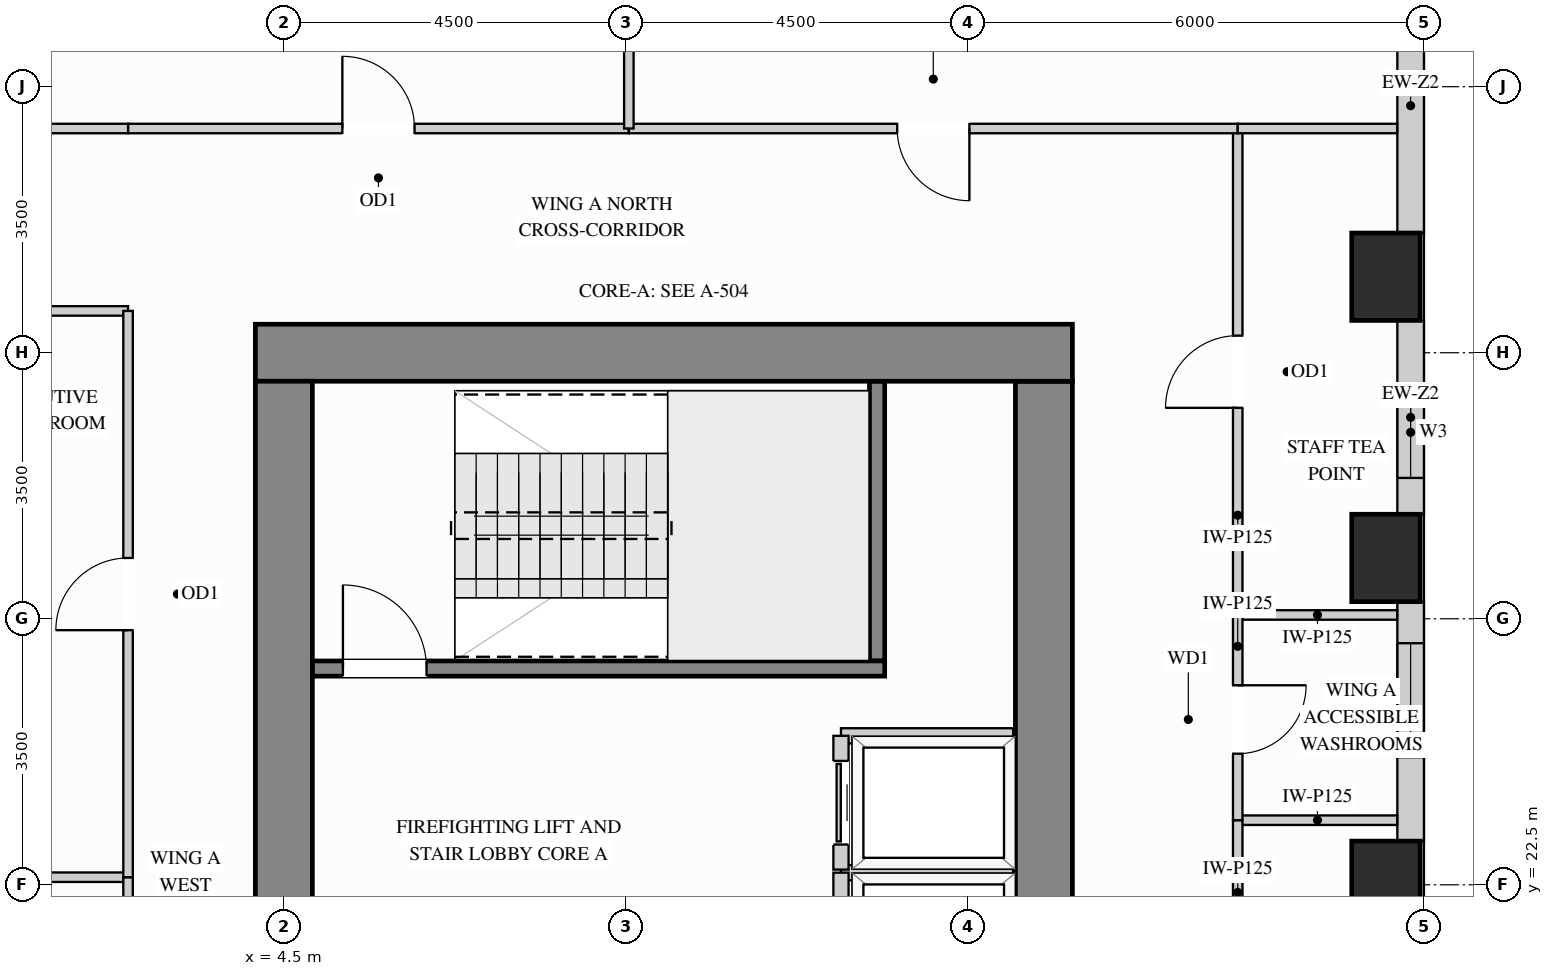
"""IFC4 building model, lengths in metres.
Left out: names, types, materials, properties, quantities, classifications, styles, units other than length and angle.
Written with IfcOpenShell. Run it as: python <this file> out.ifc"""

import sys

from ifc_helpers import new_model, si_unit, direction, frame, frame_2d, origin, origin_2d, place, context, subcontext, project, spatial, rectangle, extrude, source, transform, mapped, element, fill, save


model = new_model("IFC4")
c1 = context("Model", 3, precision=1e-05, world=origin(), true_north=direction((0.0, 1.0)))
c2 = subcontext(c1, "Body", "Model", "MODEL_VIEW")
j1 = project(units=[si_unit("LENGTHUNIT", "METRE"), si_unit("PLANEANGLEUNIT", "RADIAN")], contexts=[c1])
p1 = place(None, origin())
s1 = spatial("IfcSite", under=j1, at=p1, CompositionType="ELEMENT")
p2 = place(p1, origin())
s2 = spatial("IfcBuilding", under=s1, at=p2, CompositionType="ELEMENT")
p3 = place(p2, frame((0.0, 0.0, 131.4)))
s3 = spatial("IfcBuildingStorey", under=s2, at=p3, CompositionType="ELEMENT", Elevation=131.4)
m1 = source(origin(), c2, "Body", "SweptSolid", [
    extrude(rectangle(XDim=0.9, YDim=1.15, at=origin_2d()), origin(), (0.0, 0.0, 1.0), 3.38),
])
for number, where, z_axis, x_axis in (
    (1, (19.0, 22.5, 0.0), (0.0, 0.0, 1.0), (1.0, 0.0, 0.0)),
    (2, (19.0, 26.8, 0.0), (0.0, 0.0, 1.0), (1.0, 0.0, 0.0)),
    (3, (19.0, 30.5, 0.0), (0.0, 0.0, 1.0), (1.0, 0.0, 0.0)),
):
    element("IfcColumn", number, at=place(p3, frame(where, z_axis=z_axis, x_axis=x_axis)), inside=s3, PredefinedType="COLUMN", context=c2, shape_type="MappedRepresentation", body=[
        mapped(m1, transform((0.0, 0.0, 0.0), x_axis=(1.0, 0.0, 0.0), y_axis=(0.0, 1.0, 0.0), z_axis=(0.0, 0.0, 1.0))),
    ])
m2 = source(origin(), c2, "Body", "SweptSolid", [
    extrude(rectangle(XDim=8.245, YDim=0.75, at=frame_2d((4.123, 0.0))), origin(), (0.0, 0.0, 1.0), 3.38),
])
p4 = place(p3, frame((14.5, 20.88, 0.0), z_axis=(0.0, 0.0, 1.0), x_axis=(0.0, 1.0, 0.0)))
e4 = element("IfcWall", 4, at=p4, inside=s3, PredefinedType="SHEAR", context=c2, shape_type="MappedRepresentation", body=[
    mapped(m2, transform((0.0, 0.0, 0.0), x_axis=(1.0, 0.0, 0.0), y_axis=(0.0, 1.0, 0.0), z_axis=(0.0, 0.0, 1.0))),
])
m3 = source(origin(), c2, "Body", "SweptSolid", [
    extrude(rectangle(XDim=10.75, YDim=0.75, at=frame_2d((5.375, 0.0))), origin(), (0.0, 0.0, 1.0), 3.38),
])
p5 = place(p3, frame((4.125, 29.5, 0.0), z_axis=(0.0, 0.0, 1.0), x_axis=(1.0, 0.0, 0.0)))
e5 = element("IfcWall", 5, at=p5, inside=s3, PredefinedType="SHEAR", context=c2, shape_type="MappedRepresentation", body=[
    mapped(m3, transform((0.0, 0.0, 0.0), x_axis=(1.0, 0.0, 0.0), y_axis=(0.0, 1.0, 0.0), z_axis=(0.0, 0.0, 1.0))),
])
m4 = source(origin(), c2, "Body", "SweptSolid", [
    extrude(rectangle(XDim=20.25, YDim=0.75, at=frame_2d((10.125, 0.0))), origin(), (0.0, 0.0, 1.0), 3.38),
])
p6 = place(p3, frame((4.5, 8.875, 0.0), z_axis=(0.0, 0.0, 1.0), x_axis=(0.0, 1.0, 0.0)))
e6 = element("IfcWall", 6, at=p6, inside=s3, PredefinedType="SHEAR", context=c2, shape_type="MappedRepresentation", body=[
    mapped(m4, transform((0.0, 0.0, 0.0), x_axis=(1.0, 0.0, 0.0), y_axis=(0.0, 1.0, 0.0), z_axis=(0.0, 0.0, 1.0))),
])
p7 = place(p3, frame((19.325, 23.073, 0.0), z_axis=(0.0, 0.0, 1.0), x_axis=(0.0, 1.0, 0.0)))
e7 = element("IfcWall", 7, at=p7, inside=s3, PredefinedType="SOLIDWALL", context=c2, shape_type="SweptSolid", body=[
    extrude(rectangle(XDim=3.154, YDim=0.35, at=frame_2d((1.577, 0.0))), origin(), (0.0, 0.0, 1.0), 2.519),
])
p8 = place(p7, frame((1.105, 0.0, 0.78)))
e8 = element("IfcOpeningElement", 8, at=p8, cuts=e7, PredefinedType="OPENING", context=c2, shape_type="SweptSolid", body=[
    extrude(rectangle(XDim=1.5, YDim=1.559, at=frame_2d((0.75, 0.78))), frame((0.0, 0.185, 0.0), z_axis=(0.0, -1.0, 0.0), x_axis=(1.0, 0.0, 0.0)), (0.0, 0.0, 1.0), 0.37),
])
p9 = place(p3, frame((19.325, 27.373, 0.0), z_axis=(0.0, 0.0, 1.0), x_axis=(0.0, 1.0, 0.0)))
e9 = element("IfcWall", 9, at=p9, inside=s3, PredefinedType="SOLIDWALL", context=c2, shape_type="SweptSolid", body=[
    extrude(rectangle(XDim=2.554, YDim=0.35, at=frame_2d((1.277, 0.0))), origin(), (0.0, 0.0, 1.0), 2.519),
])
p10 = place(p9, frame((0.48, 0.0, 0.78)))
e10 = element("IfcOpeningElement", 10, at=p10, cuts=e9, PredefinedType="OPENING", context=c2, shape_type="SweptSolid", body=[
    extrude(rectangle(XDim=1.2, YDim=1.559, at=frame_2d((0.6, 0.78))), frame((0.0, 0.185, 0.0), z_axis=(0.0, -1.0, 0.0), x_axis=(1.0, 0.0, 0.0)), (0.0, 0.0, 1.0), 0.37),
])
m5 = source(origin(), c2, "Body", "SweptSolid", [
    extrude(rectangle(XDim=3.354, YDim=0.35, at=frame_2d((1.677, 0.0))), origin(), (0.0, 0.0, 1.0), 2.519),
])
p11 = place(p3, frame((19.325, 31.073, 0.0), z_axis=(0.0, 0.0, 1.0), x_axis=(0.0, 1.0, 0.0)))
e11 = element("IfcWall", 11, at=p11, inside=s3, PredefinedType="SOLIDWALL", context=c2, shape_type="MappedRepresentation", body=[
    mapped(m5, transform((0.0, 0.0, 0.0), x_axis=(1.0, 0.0, 0.0), y_axis=(0.0, 1.0, 0.0), z_axis=(0.0, 0.0, 1.0))),
])
m6 = source(origin(), c2, "Body", "SweptSolid", [
    extrude(rectangle(XDim=2.098, YDim=0.125, at=frame_2d((1.049, 0.0))), origin(), (0.0, 0.0, 1.0), 3.365),
])
for number, where, z_axis, x_axis in (
    (12, (17.05, 23.35, 0.0), (0.0, 0.0, 1.0), (1.0, 0.0, 0.0)),
    (13, (17.05, 26.05, 0.0), (0.0, 0.0, 1.0), (1.0, 0.0, 0.0)),
):
    element("IfcWall", number, at=place(p3, frame(where, z_axis=z_axis, x_axis=x_axis)), inside=s3, PredefinedType="PARTITIONING", context=c2, shape_type="MappedRepresentation", body=[
        mapped(m6, transform((0.0, 0.0, 0.0), x_axis=(1.0, 0.0, 0.0), y_axis=(0.0, 1.0, 0.0), z_axis=(0.0, 0.0, 1.0))),
    ])
p12 = place(p3, frame((17.05, 18.4, 0.0), z_axis=(0.0, 0.0, 1.0), x_axis=(0.0, 1.0, 0.0)))
e14 = element("IfcWall", 14, at=p12, inside=s3, PredefinedType="PARTITIONING", context=c2, shape_type="SweptSolid", body=[
    extrude(rectangle(XDim=4.95, YDim=0.125, at=frame_2d((2.475, 0.0))), origin(), (0.0, 0.0, 1.0), 3.365),
])
p13 = place(p12, frame((2.0, 0.0, 0.0)))
e15 = element("IfcOpeningElement", 15, at=p13, cuts=e14, PredefinedType="OPENING", context=c2, shape_type="SweptSolid", body=[
    extrude(rectangle(XDim=0.95, YDim=2.15, at=frame_2d((0.475, 1.075))), frame((0.0, 0.073, 0.0), z_axis=(0.0, -1.0, 0.0), x_axis=(1.0, 0.0, 0.0)), (0.0, 0.0, 1.0), 0.145),
])
p14 = place(p3, frame((17.05, 26.05, 0.0), z_axis=(0.0, 0.0, 1.0), x_axis=(0.0, 1.0, 0.0)))
e16 = element("IfcWall", 16, at=p14, inside=s3, PredefinedType="PARTITIONING", context=c2, shape_type="SweptSolid", body=[
    extrude(rectangle(XDim=6.4, YDim=0.125, at=frame_2d((3.2, 0.0))), origin(), (0.0, 0.0, 1.0), 3.365),
])
p15 = place(p14, frame((2.725, 0.0, 0.0)))
e17 = element("IfcOpeningElement", 17, at=p15, cuts=e16, PredefinedType="OPENING", context=c2, shape_type="SweptSolid", body=[
    extrude(rectangle(XDim=0.95, YDim=2.15, at=frame_2d((0.475, 1.075))), frame((0.0, 0.073, 0.0), z_axis=(0.0, -1.0, 0.0), x_axis=(1.0, 0.0, 0.0)), (0.0, 0.0, 1.0), 0.145),
])
p16 = place(p3, frame((17.05, 23.35, 0.0), z_axis=(0.0, 0.0, 1.0), x_axis=(0.0, 1.0, 0.0)))
e18 = element("IfcWall", 18, at=p16, inside=s3, PredefinedType="PARTITIONING", context=c2, shape_type="SweptSolid", body=[
    extrude(rectangle(XDim=2.7, YDim=0.125, at=frame_2d((1.35, 0.0))), origin(), (0.0, 0.0, 1.0), 3.365),
])
p17 = place(p16, frame((0.875, 0.0, 0.0)))
e19 = element("IfcOpeningElement", 19, at=p17, cuts=e18, PredefinedType="OPENING", context=c2, shape_type="SweptSolid", body=[
    extrude(rectangle(XDim=0.9, YDim=2.15, at=frame_2d((0.45, 1.075))), frame((0.0, 0.073, 0.0), z_axis=(0.0, -1.0, 0.0), x_axis=(1.0, 0.0, 0.0)), (0.0, 0.0, 1.0), 0.145),
])
p18 = place(p3, frame((2.45, 32.45, 0.0), z_axis=(0.0, 0.0, 1.0), x_axis=(1.0, 0.0, 0.0)))
e20 = element("IfcWall", 20, at=p18, inside=s3, PredefinedType="PARTITIONING", context=c2, shape_type="SweptSolid", body=[
    extrude(rectangle(XDim=6.589, YDim=0.125, at=frame_2d((3.294, 0.0))), origin(), (0.0, 0.0, 1.0), 3.365),
])
p19 = place(p18, frame((2.82, 0.0, 0.0)))
e21 = element("IfcOpeningElement", 21, at=p19, cuts=e20, PredefinedType="OPENING", context=c2, shape_type="SweptSolid", body=[
    extrude(rectangle(XDim=0.95, YDim=2.15, at=frame_2d((0.475, 1.075))), frame((0.0, 0.073, 0.0), z_axis=(0.0, -1.0, 0.0), x_axis=(1.0, 0.0, 0.0)), (0.0, 0.0, 1.0), 0.145),
])
p20 = place(p3, frame((9.039, 32.45, 0.0), z_axis=(0.0, 0.0, 1.0), x_axis=(1.0, 0.0, 0.0)))
e22 = element("IfcWall", 22, at=p20, inside=s3, PredefinedType="PARTITIONING", context=c2, shape_type="SweptSolid", body=[
    extrude(rectangle(XDim=8.011, YDim=0.125, at=frame_2d((4.005, 0.0))), origin(), (0.0, 0.0, 1.0), 3.365),
])
p21 = place(p20, frame((3.531, 0.0, 0.0)))
e23 = element("IfcOpeningElement", 23, at=p21, cuts=e22, PredefinedType="OPENING", context=c2, shape_type="SweptSolid", body=[
    extrude(rectangle(XDim=0.95, YDim=2.15, at=frame_2d((0.475, 1.075))), frame((0.0, 0.073, 0.0), z_axis=(0.0, -1.0, 0.0), x_axis=(1.0, 0.0, 0.0)), (0.0, 0.0, 1.0), 0.145),
])
for number, where, z_axis, x_axis in (
    (24, (17.05, 32.45, 0.0), (0.0, 0.0, 1.0), (1.0, 0.0, 0.0)),
    (25, (0.352, 32.45, 0.0), (0.0, 0.0, 1.0), (1.0, 0.0, 0.0)),
):
    element("IfcWall", number, at=place(p3, frame(where, z_axis=z_axis, x_axis=x_axis)), inside=s3, PredefinedType="PARTITIONING", context=c2, shape_type="MappedRepresentation", body=[
        mapped(m6, transform((0.0, 0.0, 0.0), x_axis=(1.0, 0.0, 0.0), y_axis=(0.0, 1.0, 0.0), z_axis=(0.0, 0.0, 1.0))),
    ])
m7 = source(origin(), c2, "Body", "SweptSolid", [
    extrude(rectangle(XDim=4.86, YDim=0.125, at=frame_2d((2.43, 0.0))), origin(), (0.0, 0.0, 1.0), 3.365),
])
p22 = place(p3, frame((9.039, 32.45, 0.0), z_axis=(0.0, 0.0, 1.0), x_axis=(0.0, 1.0, 0.0)))
e26 = element("IfcWall", 26, at=p22, inside=s3, PredefinedType="PARTITIONING", context=c2, shape_type="MappedRepresentation", body=[
    mapped(m7, transform((0.0, 0.0, 0.0), x_axis=(1.0, 0.0, 0.0), y_axis=(0.0, 1.0, 0.0), z_axis=(0.0, 0.0, 1.0))),
])
m8 = source(origin(), c2, "Body", "SweptSolid", [
    extrude(rectangle(XDim=1.26, YDim=0.125, at=frame_2d((0.63, 0.0))), origin(), (0.0, 0.0, 1.0), 3.365),
])
for number, where, z_axis, x_axis in (
    (27, (1.19, 30.05, 0.0), (0.0, 0.0, 1.0), (1.0, 0.0, 0.0)),
    (28, (1.19, 22.6, 0.0), (0.0, 0.0, 1.0), (1.0, 0.0, 0.0)),
):
    element("IfcWall", number, at=place(p3, frame(where, z_axis=z_axis, x_axis=x_axis)), inside=s3, PredefinedType="PARTITIONING", context=c2, shape_type="MappedRepresentation", body=[
        mapped(m8, transform((0.0, 0.0, 0.0), x_axis=(1.0, 0.0, 0.0), y_axis=(0.0, 1.0, 0.0), z_axis=(0.0, 0.0, 1.0))),
    ])
p23 = place(p3, frame((2.45, 15.1, 0.0), z_axis=(0.0, 0.0, 1.0), x_axis=(0.0, 1.0, 0.0)))
e29 = element("IfcWall", 29, at=p23, inside=s3, PredefinedType="PARTITIONING", context=c2, shape_type="SweptSolid", body=[
    extrude(rectangle(XDim=7.5, YDim=0.125, at=frame_2d((3.75, 0.0))), origin(), (0.0, 0.0, 1.0), 3.365),
])
p24 = place(p23, frame((3.275, 0.0, 0.0)))
e30 = element("IfcOpeningElement", 30, at=p24, cuts=e29, PredefinedType="OPENING", context=c2, shape_type="SweptSolid", body=[
    extrude(rectangle(XDim=0.95, YDim=2.15, at=frame_2d((0.475, 1.075))), frame((0.0, 0.073, 0.0), z_axis=(0.0, -1.0, 0.0), x_axis=(1.0, 0.0, 0.0)), (0.0, 0.0, 1.0), 0.145),
])
p25 = place(p3, frame((2.45, 22.6, 0.0), z_axis=(0.0, 0.0, 1.0), x_axis=(0.0, 1.0, 0.0)))
e31 = element("IfcWall", 31, at=p25, inside=s3, PredefinedType="PARTITIONING", context=c2, shape_type="SweptSolid", body=[
    extrude(rectangle(XDim=7.45, YDim=0.125, at=frame_2d((3.725, 0.0))), origin(), (0.0, 0.0, 1.0), 3.365),
])
p26 = place(p25, frame((3.25, 0.0, 0.0)))
e32 = element("IfcOpeningElement", 32, at=p26, cuts=e31, PredefinedType="OPENING", context=c2, shape_type="SweptSolid", body=[
    extrude(rectangle(XDim=0.95, YDim=2.15, at=frame_2d((0.475, 1.075))), frame((0.0, 0.073, 0.0), z_axis=(0.0, -1.0, 0.0), x_axis=(1.0, 0.0, 0.0)), (0.0, 0.0, 1.0), 0.145),
])
m9 = source(origin(), c2, "Body", "SweptSolid", [
    extrude(rectangle(XDim=2.265, YDim=0.2, at=frame_2d((1.132, 0.0))), origin(), (0.0, 0.0, 1.0), 3.365),
])
p27 = place(p3, frame((11.83, 22.66, 0.0), z_axis=(0.0, 0.0, 1.0), x_axis=(1.0, 0.0, 0.0)))
e33 = element("IfcWall", 33, at=p27, inside=s3, PredefinedType="PARTITIONING", context=c2, shape_type="MappedRepresentation", body=[
    mapped(m9, transform((0.0, 0.0, 0.0), x_axis=(1.0, 0.0, 0.0), y_axis=(0.0, 1.0, 0.0), z_axis=(0.0, 0.0, 1.0))),
])
p28 = place(p3, frame((11.83, 20.9, 0.0), z_axis=(0.0, 0.0, 1.0), x_axis=(0.0, 1.0, 0.0)))
e34 = element("IfcWall", 34, at=p28, inside=s3, PredefinedType="PARTITIONING", context=c2, shape_type="SweptSolid", body=[
    extrude(rectangle(XDim=1.76, YDim=0.2, at=frame_2d((0.88, 0.0))), origin(), (0.0, 0.0, 1.0), 3.365),
])
p29 = place(p28, frame((0.33, 0.0, 0.0)))
e35 = element("IfcOpeningElement", 35, at=p29, cuts=e34, PredefinedType="OPENING", context=c2, shape_type="SweptSolid", body=[
    extrude(rectangle(XDim=1.1, YDim=2.2, at=frame_2d((0.55, 1.1))), frame((0.0, 0.11, 0.0), z_axis=(0.0, -1.0, 0.0), x_axis=(1.0, 0.0, 0.0)), (0.0, 0.0, 1.0), 0.22),
])
p30 = place(p3, frame((11.83, 24.46, 0.0), z_axis=(0.0, 0.0, 1.0), x_axis=(1.0, 0.0, 0.0)))
e36 = element("IfcWall", 36, at=p30, inside=s3, PredefinedType="PARTITIONING", context=c2, shape_type="MappedRepresentation", body=[
    mapped(m9, transform((0.0, 0.0, 0.0), x_axis=(1.0, 0.0, 0.0), y_axis=(0.0, 1.0, 0.0), z_axis=(0.0, 0.0, 1.0))),
])
p31 = place(p3, frame((11.83, 22.7, 0.0), z_axis=(0.0, 0.0, 1.0), x_axis=(0.0, 1.0, 0.0)))
e37 = element("IfcWall", 37, at=p31, inside=s3, PredefinedType="PARTITIONING", context=c2, shape_type="SweptSolid", body=[
    extrude(rectangle(XDim=1.76, YDim=0.2, at=frame_2d((0.88, 0.0))), origin(), (0.0, 0.0, 1.0), 3.365),
])
p32 = place(p31, frame((0.33, 0.0, 0.0)))
e38 = element("IfcOpeningElement", 38, at=p32, cuts=e37, PredefinedType="OPENING", context=c2, shape_type="SweptSolid", body=[
    extrude(rectangle(XDim=1.1, YDim=2.2, at=frame_2d((0.55, 1.1))), frame((0.0, 0.11, 0.0), z_axis=(0.0, -1.0, 0.0), x_axis=(1.0, 0.0, 0.0)), (0.0, 0.0, 1.0), 0.22),
])
m10 = source(origin(), c2, "Body", "SweptSolid", [
    extrude(rectangle(XDim=3.678, YDim=0.2, at=frame_2d((1.839, 0.0))), origin(), (0.0, 0.0, 1.0), 3.38),
])
p33 = place(p3, frame((12.305, 25.445, 0.0), z_axis=(0.0, 0.0, 1.0), x_axis=(0.0, 1.0, 0.0)))
e39 = element("IfcWall", 39, at=p33, inside=s3, PredefinedType="SHEAR", context=c2, shape_type="MappedRepresentation", body=[
    mapped(m10, transform((0.0, 0.0, 0.0), x_axis=(1.0, 0.0, 0.0), y_axis=(0.0, 1.0, 0.0), z_axis=(0.0, 0.0, 1.0))),
])
p34 = place(p3, frame((4.877, 25.345, 0.0), z_axis=(0.0, 0.0, 1.0), x_axis=(1.0, 0.0, 0.0)))
e40 = element("IfcWall", 40, at=p34, inside=s3, PredefinedType="SHEAR", context=c2, shape_type="SweptSolid", body=[
    extrude(rectangle(XDim=7.528, YDim=0.2, at=frame_2d((3.764, 0.0))), origin(), (0.0, 0.0, 1.0), 3.38),
])
p35 = place(p34, frame((0.4, 0.0, 0.0)))
e41 = element("IfcOpeningElement", 41, at=p35, cuts=e40, PredefinedType="OPENING", context=c2, shape_type="SweptSolid", body=[
    extrude(rectangle(XDim=1.1, YDim=2.15, at=frame_2d((0.55, 1.075))), frame((0.0, 0.11, 0.0), z_axis=(0.0, -1.0, 0.0), x_axis=(1.0, 0.0, 0.0)), (0.0, 0.0, 1.0), 0.22),
])
m11 = source(origin(), c2, "Body", "SweptSolid", [
    extrude(rectangle(XDim=1.1, YDim=2.2, at=frame_2d((0.55, 1.1))), frame((0.0, 0.025, 0.0), z_axis=(0.0, -1.0, 0.0), x_axis=(1.0, 0.0, 0.0)), (0.0, 0.0, 1.0), 0.05),
])
p36 = place(p32, origin())
e42 = element("IfcDoor", 42, at=p36, inside=s3, OperationType="SLIDING_TO_LEFT", PredefinedType="DOOR", context=c2, shape_type="MappedRepresentation", body=[
    mapped(m11, transform((0.0, 0.0, 0.0), x_axis=(1.0, 0.0, 0.0), y_axis=(0.0, 1.0, 0.0), z_axis=(0.0, 0.0, 1.0))),
])
fill(e38, e42)
m12 = source(origin(), c2, "Body", "SweptSolid", [
    extrude(rectangle(XDim=0.95, YDim=2.15, at=frame_2d((0.475, 1.075))), frame((0.0, 0.025, 0.0), z_axis=(0.0, -1.0, 0.0), x_axis=(1.0, 0.0, 0.0)), (0.0, 0.0, 1.0), 0.05),
])
p37 = place(p15, origin())
e43 = element("IfcDoor", 43, at=p37, inside=s3, OperationType="SINGLE_SWING_LEFT", PredefinedType="DOOR", context=c2, shape_type="MappedRepresentation", body=[
    mapped(m12, transform((0.0, 0.0, 0.0), x_axis=(1.0, 0.0, 0.0), y_axis=(0.0, 1.0, 0.0), z_axis=(0.0, 0.0, 1.0))),
])
fill(e17, e43)
p38 = place(p19, origin())
e44 = element("IfcDoor", 44, at=p38, inside=s3, OperationType="SINGLE_SWING_LEFT", PredefinedType="DOOR", context=c2, shape_type="MappedRepresentation", body=[
    mapped(m12, transform((0.0, 0.0, 0.0), x_axis=(1.0, 0.0, 0.0), y_axis=(0.0, 1.0, 0.0), z_axis=(0.0, 0.0, 1.0))),
])
fill(e21, e44)
p39 = place(p21, origin())
e45 = element("IfcDoor", 45, at=p39, inside=s3, OperationType="SINGLE_SWING_RIGHT", PredefinedType="DOOR", context=c2, shape_type="MappedRepresentation", body=[
    mapped(m12, transform((0.0, 0.0, 0.0), x_axis=(1.0, 0.0, 0.0), y_axis=(0.0, 1.0, 0.0), z_axis=(0.0, 0.0, 1.0))),
])
fill(e23, e45)
p40 = place(p26, origin())
e46 = element("IfcDoor", 46, at=p40, inside=s3, OperationType="SINGLE_SWING_LEFT", PredefinedType="DOOR", context=c2, shape_type="MappedRepresentation", body=[
    mapped(m12, transform((0.0, 0.0, 0.0), x_axis=(1.0, 0.0, 0.0), y_axis=(0.0, 1.0, 0.0), z_axis=(0.0, 0.0, 1.0))),
])
fill(e32, e46)
m13 = source(origin(), c2, "Body", "SweptSolid", [
    extrude(rectangle(XDim=1.1, YDim=2.15, at=frame_2d((0.55, 1.075))), frame((0.0, 0.025, 0.0), z_axis=(0.0, -1.0, 0.0), x_axis=(1.0, 0.0, 0.0)), (0.0, 0.0, 1.0), 0.05),
])
p41 = place(p35, origin())
e47 = element("IfcDoor", 47, at=p41, inside=s3, OperationType="SINGLE_SWING_LEFT", PredefinedType="DOOR", context=c2, shape_type="MappedRepresentation", body=[
    mapped(m13, transform((0.0, 0.0, 0.0), x_axis=(1.0, 0.0, 0.0), y_axis=(0.0, 1.0, 0.0), z_axis=(0.0, 0.0, 1.0))),
])
fill(e41, e47)
m14 = source(origin(), c2, "Body", "SweptSolid", [
    extrude(rectangle(XDim=0.9, YDim=2.15, at=frame_2d((0.45, 1.075))), frame((0.0, 0.025, 0.0), z_axis=(0.0, -1.0, 0.0), x_axis=(1.0, 0.0, 0.0)), (0.0, 0.0, 1.0), 0.05),
])
p42 = place(p17, origin())
e48 = element("IfcDoor", 48, at=p42, inside=s3, OperationType="SINGLE_SWING_RIGHT", PredefinedType="DOOR", context=c2, shape_type="MappedRepresentation", body=[
    mapped(m14, transform((0.0, 0.0, 0.0), x_axis=(1.0, 0.0, 0.0), y_axis=(0.0, 1.0, 0.0), z_axis=(0.0, 0.0, 1.0))),
])
fill(e19, e48)
m15 = source(origin(), c2, "Body", "SweptSolid", [
    extrude(rectangle(XDim=1.2, YDim=1.559, at=frame_2d((0.6, 0.78))), frame((0.0, 0.03, 0.0), z_axis=(0.0, -1.0, 0.0), x_axis=(1.0, 0.0, 0.0)), (0.0, 0.0, 1.0), 0.06),
])
p43 = place(p10, origin())
e49 = element("IfcWindow", 49, at=p43, inside=s3, PartitioningType="SINGLE_PANEL", PredefinedType="WINDOW", context=c2, shape_type="MappedRepresentation", body=[
    mapped(m15, transform((0.0, 0.0, 0.0), x_axis=(1.0, 0.0, 0.0), y_axis=(0.0, 1.0, 0.0), z_axis=(0.0, 0.0, 1.0))),
])
fill(e10, e49)
m16 = source(origin(), c2, "Body", "SweptSolid", [
    extrude(rectangle(XDim=1.5, YDim=1.559, at=frame_2d((0.75, 0.78))), frame((0.0, 0.03, 0.0), z_axis=(0.0, -1.0, 0.0), x_axis=(1.0, 0.0, 0.0)), (0.0, 0.0, 1.0), 0.06),
])
p44 = place(p8, origin())
e50 = element("IfcWindow", 50, at=p44, inside=s3, PartitioningType="SINGLE_PANEL", PredefinedType="WINDOW", context=c2, shape_type="MappedRepresentation", body=[
    mapped(m16, transform((0.0, 0.0, 0.0), x_axis=(1.0, 0.0, 0.0), y_axis=(0.0, 1.0, 0.0), z_axis=(0.0, 0.0, 1.0))),
])
fill(e8, e50)
save(model, sys.argv[1])
